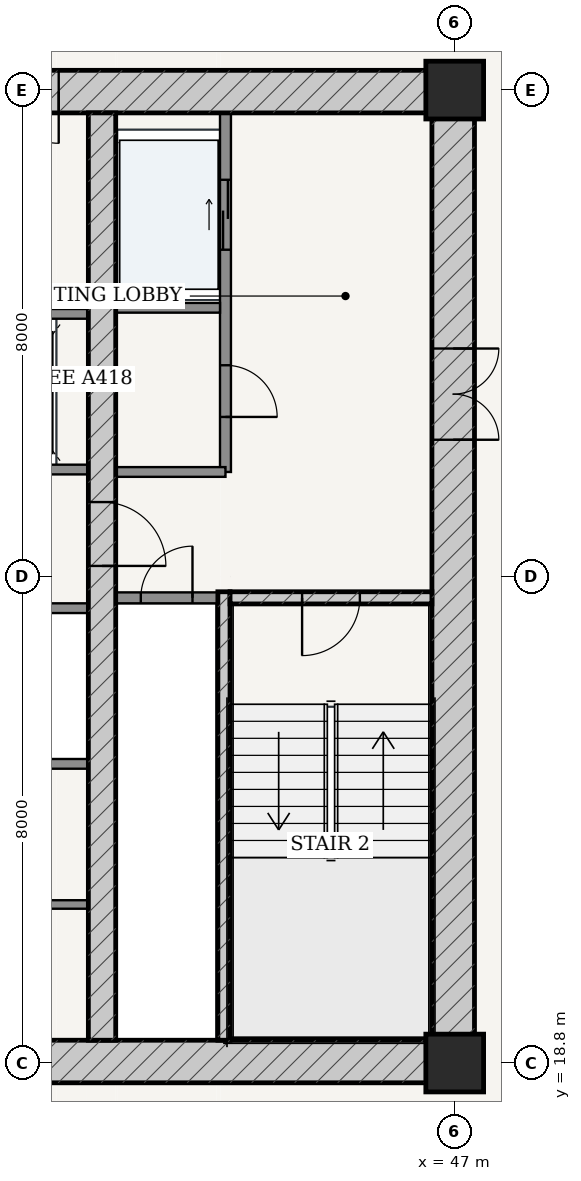
"""IFC4 building model, lengths in metres.
Left out: names, types, materials, properties, quantities, classifications, styles, units other than length and angle.
Written with IfcOpenShell. Run it as: python <this file> out.ifc"""

import sys

from ifc_helpers import new_model, si_unit, direction, frame, frame_2d, origin, origin_2d, place, context, subcontext, project, spatial, rectangle, extrude, source, transform, mapped, element, fill, save


model = new_model("IFC4")
c1 = context("Model", 3, precision=1e-05, world=origin(), true_north=direction((-0.2419218956, 0.970295726276)))
c2 = subcontext(c1, "Body", "Model", "MODEL_VIEW")
j1 = project(units=[si_unit("LENGTHUNIT", "METRE"), si_unit("PLANEANGLEUNIT", "RADIAN")], contexts=[c1])
p1 = place(None, origin())
s1 = spatial("IfcSite", under=j1, at=p1, CompositionType="ELEMENT")
p2 = place(p1, origin())
s2 = spatial("IfcBuilding", under=s1, at=p2, CompositionType="ELEMENT")
p3 = place(p2, frame((0.0, 0.0, 112.2)))
s3 = spatial("IfcBuildingStorey", under=s2, at=p3, CompositionType="ELEMENT", Elevation=112.2)
for number, where, z_axis, x_axis in (
    (1, (47.0, 18.8, 0.0), (0.0, 0.0, 1.0), (1.0, 0.0, 0.0)),
    (2, (47.0, 34.8, 0.0), (0.0, 0.0, 1.0), (1.0, 0.0, 0.0)),
):
    element("IfcColumn", number, at=place(p3, frame(where, z_axis=z_axis, x_axis=x_axis)), inside=s3, PredefinedType="COLUMN", context=c2, shape_type="SweptSolid", body=[
        extrude(rectangle(XDim=0.95, YDim=0.95, at=origin_2d()), origin(), (0.0, 0.0, 1.0), 3.6),
    ])
p4 = place(p3, frame((28.675, 18.825, 0.0), z_axis=(0.0, 0.0, 1.0), x_axis=(1.0, 0.0, 0.0)))
e3 = element("IfcWall", 3, at=p4, inside=s3, PredefinedType="SHEAR", context=c2, shape_type="SweptSolid", body=[
    extrude(rectangle(XDim=18.65, YDim=0.7, at=frame_2d((9.325, 0.0))), origin(), (0.0, 0.0, 1.0), 3.325),
])
p5 = place(p4, frame((7.577, 0.0, 0.0)))
e4 = element("IfcOpeningElement", 4, at=p5, cuts=e3, PredefinedType="OPENING", context=c2, shape_type="SweptSolid", body=[
    extrude(rectangle(XDim=0.85, YDim=2.1, at=frame_2d((0.425, 1.05))), frame((0.0, 0.36, 0.0), z_axis=(0.0, -1.0, 0.0), x_axis=(1.0, 0.0, 0.0)), (0.0, 0.0, 1.0), 0.72),
])
p6 = place(p4, frame((10.623, 0.0, 0.0)))
e5 = element("IfcOpeningElement", 5, at=p6, cuts=e3, PredefinedType="OPENING", context=c2, shape_type="SweptSolid", body=[
    extrude(rectangle(XDim=0.85, YDim=2.1, at=frame_2d((0.425, 1.05))), frame((0.0, 0.36, 0.0), z_axis=(0.0, -1.0, 0.0), x_axis=(1.0, 0.0, 0.0)), (0.0, 0.0, 1.0), 0.72),
])
p7 = place(p3, frame((28.675, 34.775, 0.0), z_axis=(0.0, 0.0, 1.0), x_axis=(1.0, 0.0, 0.0)))
e6 = element("IfcWall", 6, at=p7, inside=s3, PredefinedType="SHEAR", context=c2, shape_type="SweptSolid", body=[
    extrude(rectangle(XDim=18.65, YDim=0.7, at=frame_2d((9.325, 0.0))), origin(), (0.0, 0.0, 1.0), 3.325),
])
p8 = place(p7, frame((6.837, 0.0, 0.0)))
e7 = element("IfcOpeningElement", 7, at=p8, cuts=e6, PredefinedType="OPENING", context=c2, shape_type="SweptSolid", body=[
    extrude(rectangle(XDim=0.85, YDim=2.1, at=frame_2d((0.425, 1.05))), frame((0.0, 0.36, 0.0), z_axis=(0.0, -1.0, 0.0), x_axis=(1.0, 0.0, 0.0)), (0.0, 0.0, 1.0), 0.72),
])
p9 = place(p7, frame((8.895, 0.0, 0.0)))
e8 = element("IfcOpeningElement", 8, at=p9, cuts=e6, PredefinedType="OPENING", context=c2, shape_type="SweptSolid", body=[
    extrude(rectangle(XDim=0.86, YDim=2.1, at=frame_2d((0.43, 1.05))), frame((0.0, 0.36, 0.0), z_axis=(0.0, -1.0, 0.0), x_axis=(1.0, 0.0, 0.0)), (0.0, 0.0, 1.0), 0.72),
])
p10 = place(p7, frame((10.962, 0.0, 0.0)))
e9 = element("IfcOpeningElement", 9, at=p10, cuts=e6, PredefinedType="OPENING", context=c2, shape_type="SweptSolid", body=[
    extrude(rectangle(XDim=0.85, YDim=2.1, at=frame_2d((0.425, 1.05))), frame((0.0, 0.36, 0.0), z_axis=(0.0, -1.0, 0.0), x_axis=(1.0, 0.0, 0.0)), (0.0, 0.0, 1.0), 0.72),
])
p11 = place(p3, frame((46.975, 19.175, 0.0), z_axis=(0.0, 0.0, 1.0), x_axis=(0.0, 1.0, 0.0)))
e10 = element("IfcWall", 10, at=p11, inside=s3, PredefinedType="SHEAR", context=c2, shape_type="SweptSolid", body=[
    extrude(rectangle(XDim=15.25, YDim=0.7, at=frame_2d((7.625, 0.0))), origin(), (0.0, 0.0, 1.0), 3.325),
])
p12 = place(p11, frame((9.875, 0.0, 0.0)))
e11 = element("IfcOpeningElement", 11, at=p12, cuts=e10, PredefinedType="OPENING", context=c2, shape_type="SweptSolid", body=[
    extrude(rectangle(XDim=1.5, YDim=2.2, at=frame_2d((0.75, 1.1))), frame((0.0, 0.36, 0.0), z_axis=(0.0, -1.0, 0.0), x_axis=(1.0, 0.0, 0.0)), (0.0, 0.0, 1.0), 0.72),
])
p13 = place(p3, frame((43.205, 19.175, 0.0), z_axis=(0.0, 0.0, 1.0), x_axis=(0.0, 1.0, 0.0)))
e12 = element("IfcWall", 12, at=p13, inside=s3, PredefinedType="SOLIDWALL", context=c2, shape_type="SweptSolid", body=[
    extrude(rectangle(XDim=7.375, YDim=0.2, at=frame_2d((3.688, 0.0))), origin(), (0.0, 0.0, 1.0), 3.325),
])
p14 = place(p3, frame((43.305, 26.45, 0.0), z_axis=(0.0, 0.0, 1.0), x_axis=(1.0, 0.0, 0.0)))
e13 = element("IfcWall", 13, at=p14, inside=s3, PredefinedType="SOLIDWALL", context=c2, shape_type="SweptSolid", body=[
    extrude(rectangle(XDim=3.32, YDim=0.2, at=frame_2d((1.66, 0.0))), origin(), (0.0, 0.0, 1.0), 3.325),
])
p15 = place(p14, frame((1.185, 0.0, 0.0)))
e14 = element("IfcOpeningElement", 14, at=p15, cuts=e13, PredefinedType="OPENING", context=c2, shape_type="SweptSolid", body=[
    extrude(rectangle(XDim=0.95, YDim=2.15, at=frame_2d((0.475, 1.075))), frame((0.0, 0.11, 0.0), z_axis=(0.0, -1.0, 0.0), x_axis=(1.0, 0.0, 0.0)), (0.0, 0.0, 1.0), 0.22),
])
p16 = place(p3, frame((41.2, 19.175, 0.0), z_axis=(0.0, 0.0, 1.0), x_axis=(0.0, 1.0, 0.0)))
e15 = element("IfcWall", 15, at=p16, inside=s3, PredefinedType="SHEAR", context=c2, shape_type="SweptSolid", body=[
    extrude(rectangle(XDim=15.25, YDim=0.45, at=frame_2d((7.625, 0.0))), origin(), (0.0, 0.0, 1.0), 3.325),
])
p17 = place(p16, frame((7.8, 0.0, 0.0)))
e16 = element("IfcOpeningElement", 16, at=p17, cuts=e15, PredefinedType="OPENING", context=c2, shape_type="SweptSolid", body=[
    extrude(rectangle(XDim=1.05, YDim=2.15, at=frame_2d((0.525, 1.075))), frame((0.0, 0.235, 0.0), z_axis=(0.0, -1.0, 0.0), x_axis=(1.0, 0.0, 0.0)), (0.0, 0.0, 1.0), 0.47),
])
p18 = place(p3, frame((41.425, 26.45, 0.0), z_axis=(0.0, 0.0, 1.0), x_axis=(1.0, 0.0, 0.0)))
e17 = element("IfcWall", 17, at=p18, inside=s3, PredefinedType="PARTITIONING", context=c2, shape_type="SweptSolid", body=[
    extrude(rectangle(XDim=1.675, YDim=0.18, at=frame_2d((0.837, 0.0))), origin(), (0.0, 0.0, 1.0), 3.325),
])
p19 = place(p18, frame((0.413, 0.0, 0.0)))
e18 = element("IfcOpeningElement", 18, at=p19, cuts=e17, PredefinedType="OPENING", context=c2, shape_type="SweptSolid", body=[
    extrude(rectangle(XDim=0.85, YDim=2.1, at=frame_2d((0.425, 1.05))), frame((0.0, 0.1, 0.0), z_axis=(0.0, -1.0, 0.0), x_axis=(1.0, 0.0, 0.0)), (0.0, 0.0, 1.0), 0.2),
])
p20 = place(p3, frame((43.23, 28.52, 0.0), z_axis=(0.0, 0.0, 1.0), x_axis=(0.0, 1.0, 0.0)))
e19 = element("IfcWall", 19, at=p20, inside=s3, PredefinedType="PARTITIONING", context=c2, shape_type="SweptSolid", body=[
    extrude(rectangle(XDim=5.905, YDim=0.18, at=frame_2d((2.953, 0.0))), origin(), (0.0, 0.0, 1.0), 3.325),
])
p21 = place(p20, frame((0.905, 0.0, 0.0)))
e20 = element("IfcOpeningElement", 20, at=p21, cuts=e19, PredefinedType="OPENING", context=c2, shape_type="SweptSolid", body=[
    extrude(rectangle(XDim=0.85, YDim=2.1, at=frame_2d((0.425, 1.05))), frame((0.0, 0.1, 0.0), z_axis=(0.0, -1.0, 0.0), x_axis=(1.0, 0.0, 0.0)), (0.0, 0.0, 1.0), 0.2),
])
p22 = place(p20, frame((3.655, 0.0, 0.0)))
e21 = element("IfcOpeningElement", 21, at=p22, cuts=e19, PredefinedType="OPENING", context=c2, shape_type="SweptSolid", body=[
    extrude(rectangle(XDim=1.15, YDim=2.2, at=frame_2d((0.575, 1.1))), frame((0.0, 0.1, 0.0), z_axis=(0.0, -1.0, 0.0), x_axis=(1.0, 0.0, 0.0)), (0.0, 0.0, 1.0), 0.2),
])
p23 = place(p3, frame((41.425, 31.22, 0.0), z_axis=(0.0, 0.0, 1.0), x_axis=(1.0, 0.0, 0.0)))
e22 = element("IfcWall", 22, at=p23, inside=s3, PredefinedType="PARTITIONING", context=c2, shape_type="SweptSolid", body=[
    extrude(rectangle(XDim=1.715, YDim=0.16, at=frame_2d((0.857, 0.0))), origin(), (0.0, 0.0, 1.0), 3.325),
])
p24 = place(p3, frame((41.425, 28.52, 0.0), z_axis=(0.0, 0.0, 1.0), x_axis=(1.0, 0.0, 0.0)))
e23 = element("IfcWall", 23, at=p24, inside=s3, PredefinedType="PARTITIONING", context=c2, shape_type="SweptSolid", body=[
    extrude(rectangle(XDim=1.805, YDim=0.16, at=frame_2d((0.902, 0.0))), origin(), (0.0, 0.0, 1.0), 3.325),
])
p25 = place(p3, frame((35.025, 28.56, 0.0), z_axis=(0.0, 0.0, 1.0), x_axis=(1.0, 0.0, 0.0)))
e24 = element("IfcWall", 24, at=p25, inside=s3, PredefinedType="PARTITIONING", context=c2, shape_type="SweptSolid", body=[
    extrude(rectangle(XDim=5.95, YDim=0.16, at=frame_2d((2.975, 0.0))), origin(), (0.0, 0.0, 1.0), 3.325),
])
p26 = place(p25, frame((0.76, 0.0, 0.0)))
e25 = element("IfcOpeningElement", 25, at=p26, cuts=e24, PredefinedType="OPENING", context=c2, shape_type="SweptSolid", body=[
    extrude(rectangle(XDim=1.1, YDim=2.2, at=frame_2d((0.55, 1.1))), frame((0.0, 0.09, 0.0), z_axis=(0.0, -1.0, 0.0), x_axis=(1.0, 0.0, 0.0)), (0.0, 0.0, 1.0), 0.18),
])
p27 = place(p25, frame((2.425, 0.0, 0.0)))
e26 = element("IfcOpeningElement", 26, at=p27, cuts=e24, PredefinedType="OPENING", context=c2, shape_type="SweptSolid", body=[
    extrude(rectangle(XDim=1.1, YDim=2.2, at=frame_2d((0.55, 1.1))), frame((0.0, 0.09, 0.0), z_axis=(0.0, -1.0, 0.0), x_axis=(1.0, 0.0, 0.0)), (0.0, 0.0, 1.0), 0.18),
])
p28 = place(p25, frame((4.09, 0.0, 0.0)))
e27 = element("IfcOpeningElement", 27, at=p28, cuts=e24, PredefinedType="OPENING", context=c2, shape_type="SweptSolid", body=[
    extrude(rectangle(XDim=1.1, YDim=2.2, at=frame_2d((0.55, 1.1))), frame((0.0, 0.09, 0.0), z_axis=(0.0, -1.0, 0.0), x_axis=(1.0, 0.0, 0.0)), (0.0, 0.0, 1.0), 0.18),
])
for number, where, z_axis, x_axis in (
    (28, (35.025, 31.12, 0.0), (0.0, 0.0, 1.0), (1.0, 0.0, 0.0)),
    (29, (35.025, 26.28, 0.0), (0.0, 0.0, 1.0), (1.0, 0.0, 0.0)),
    (30, (35.025, 23.72, 0.0), (0.0, 0.0, 1.0), (1.0, 0.0, 0.0)),
):
    element("IfcWall", number, at=place(p3, frame(where, z_axis=z_axis, x_axis=x_axis)), inside=s3, PredefinedType="PARTITIONING", context=c2, shape_type="SweptSolid", body=[
        extrude(rectangle(XDim=5.95, YDim=0.16, at=frame_2d((2.975, 0.0))), origin(), (0.0, 0.0, 1.0), 3.325),
    ])
p29 = place(p3, frame((38.4, 21.407, 0.0), z_axis=(0.0, 0.0, 1.0), x_axis=(1.0, 0.0, 0.0)))
e31 = element("IfcWall", 31, at=p29, inside=s3, PredefinedType="PARTITIONING", context=c2, shape_type="SweptSolid", body=[
    extrude(rectangle(XDim=2.575, YDim=0.14, at=frame_2d((1.288, 0.0))), origin(), (0.0, 0.0, 1.0), 3.325),
])
p30 = place(p29, frame((0.863, 0.0, 0.0)))
e32 = element("IfcOpeningElement", 32, at=p30, cuts=e31, PredefinedType="OPENING", context=c2, shape_type="SweptSolid", body=[
    extrude(rectangle(XDim=0.85, YDim=2.1, at=frame_2d((0.425, 1.05))), frame((0.0, 0.08, 0.0), z_axis=(0.0, -1.0, 0.0), x_axis=(1.0, 0.0, 0.0)), (0.0, 0.0, 1.0), 0.16),
])
m1 = source(origin(), c2, "Body", "SweptSolid", [
    extrude(rectangle(XDim=1.5, YDim=2.2, at=frame_2d((0.75, 1.1))), frame((0.0, 0.025, 0.0), z_axis=(0.0, -1.0, 0.0), x_axis=(1.0, 0.0, 0.0)), (0.0, 0.0, 1.0), 0.05),
])
p31 = place(p12, frame((1.5, 0.0, 0.0), z_axis=(0.0, 0.0, 1.0), x_axis=(-1.0, 0.0, 0.0)))
e33 = element("IfcDoor", 33, at=p31, inside=s3, OperationType="DOUBLE_DOOR_SINGLE_SWING", PredefinedType="DOOR", context=c2, shape_type="MappedRepresentation", body=[
    mapped(m1, transform((0.0, 0.0, 0.0), scale=1.0)),
])
fill(e11, e33)
m2 = source(origin(), c2, "Body", "SweptSolid", [
    extrude(rectangle(XDim=1.05, YDim=2.15, at=frame_2d((0.525, 1.075))), frame((0.0, 0.025, 0.0), z_axis=(0.0, -1.0, 0.0), x_axis=(1.0, 0.0, 0.0)), (0.0, 0.0, 1.0), 0.05),
])
p32 = place(p17, frame((1.05, 0.0, 0.0), z_axis=(0.0, 0.0, 1.0), x_axis=(-1.0, 0.0, 0.0)))
e34 = element("IfcDoor", 34, at=p32, inside=s3, OperationType="SINGLE_SWING_RIGHT", PredefinedType="DOOR", context=c2, shape_type="MappedRepresentation", body=[
    mapped(m2, transform((0.0, 0.0, 0.0), scale=1.0)),
])
fill(e16, e34)
m3 = source(origin(), c2, "Body", "SweptSolid", [
    extrude(rectangle(XDim=0.95, YDim=2.15, at=frame_2d((0.475, 1.075))), frame((0.0, 0.025, 0.0), z_axis=(0.0, -1.0, 0.0), x_axis=(1.0, 0.0, 0.0)), (0.0, 0.0, 1.0), 0.05),
])
p33 = place(p15, frame((0.95, 0.0, 0.0), z_axis=(0.0, 0.0, 1.0), x_axis=(-1.0, 0.0, 0.0)))
e35 = element("IfcDoor", 35, at=p33, inside=s3, OperationType="SINGLE_SWING_RIGHT", PredefinedType="DOOR", context=c2, shape_type="MappedRepresentation", body=[
    mapped(m3, transform((0.0, 0.0, 0.0), scale=1.0)),
])
fill(e14, e35)
m4 = source(origin(), c2, "Body", "SweptSolid", [
    extrude(rectangle(XDim=0.85, YDim=2.1, at=frame_2d((0.425, 1.05))), frame((0.0, 0.025, 0.0), z_axis=(0.0, -1.0, 0.0), x_axis=(1.0, 0.0, 0.0)), (0.0, 0.0, 1.0), 0.05),
])
p34 = place(p19, origin())
e36 = element("IfcDoor", 36, at=p34, inside=s3, OperationType="SINGLE_SWING_RIGHT", PredefinedType="DOOR", context=c2, shape_type="MappedRepresentation", body=[
    mapped(m4, transform((0.0, 0.0, 0.0), scale=1.0)),
])
fill(e18, e36)
p35 = place(p21, frame((0.85, 0.0, 0.0), z_axis=(0.0, 0.0, 1.0), x_axis=(-1.0, 0.0, 0.0)))
e37 = element("IfcDoor", 37, at=p35, inside=s3, OperationType="SINGLE_SWING_RIGHT", PredefinedType="DOOR", context=c2, shape_type="MappedRepresentation", body=[
    mapped(m4, transform((0.0, 0.0, 0.0), scale=1.0)),
])
fill(e20, e37)
p36 = place(p10, frame((0.85, 0.0, 0.0), z_axis=(0.0, 0.0, 1.0), x_axis=(-1.0, 0.0, 0.0)))
e38 = element("IfcDoor", 38, at=p36, inside=s3, OperationType="SINGLE_SWING_LEFT", PredefinedType="DOOR", context=c2, shape_type="MappedRepresentation", body=[
    mapped(m4, transform((0.0, 0.0, 0.0), scale=1.0)),
])
fill(e9, e38)
m5 = source(origin(), c2, "Body", "SweptSolid", [
    extrude(rectangle(XDim=1.15, YDim=2.2, at=frame_2d((0.575, 1.1))), frame((0.0, 0.025, 0.0), z_axis=(0.0, -1.0, 0.0), x_axis=(1.0, 0.0, 0.0)), (0.0, 0.0, 1.0), 0.05),
])
p37 = place(p22, origin())
e39 = element("IfcDoor", 39, at=p37, inside=s3, OperationType="DOUBLE_DOOR_SLIDING", PredefinedType="DOOR", context=c2, shape_type="MappedRepresentation", body=[
    mapped(m5, transform((0.0, 0.0, 0.0), scale=1.0)),
])
fill(e21, e39)
save(model, sys.argv[1])
